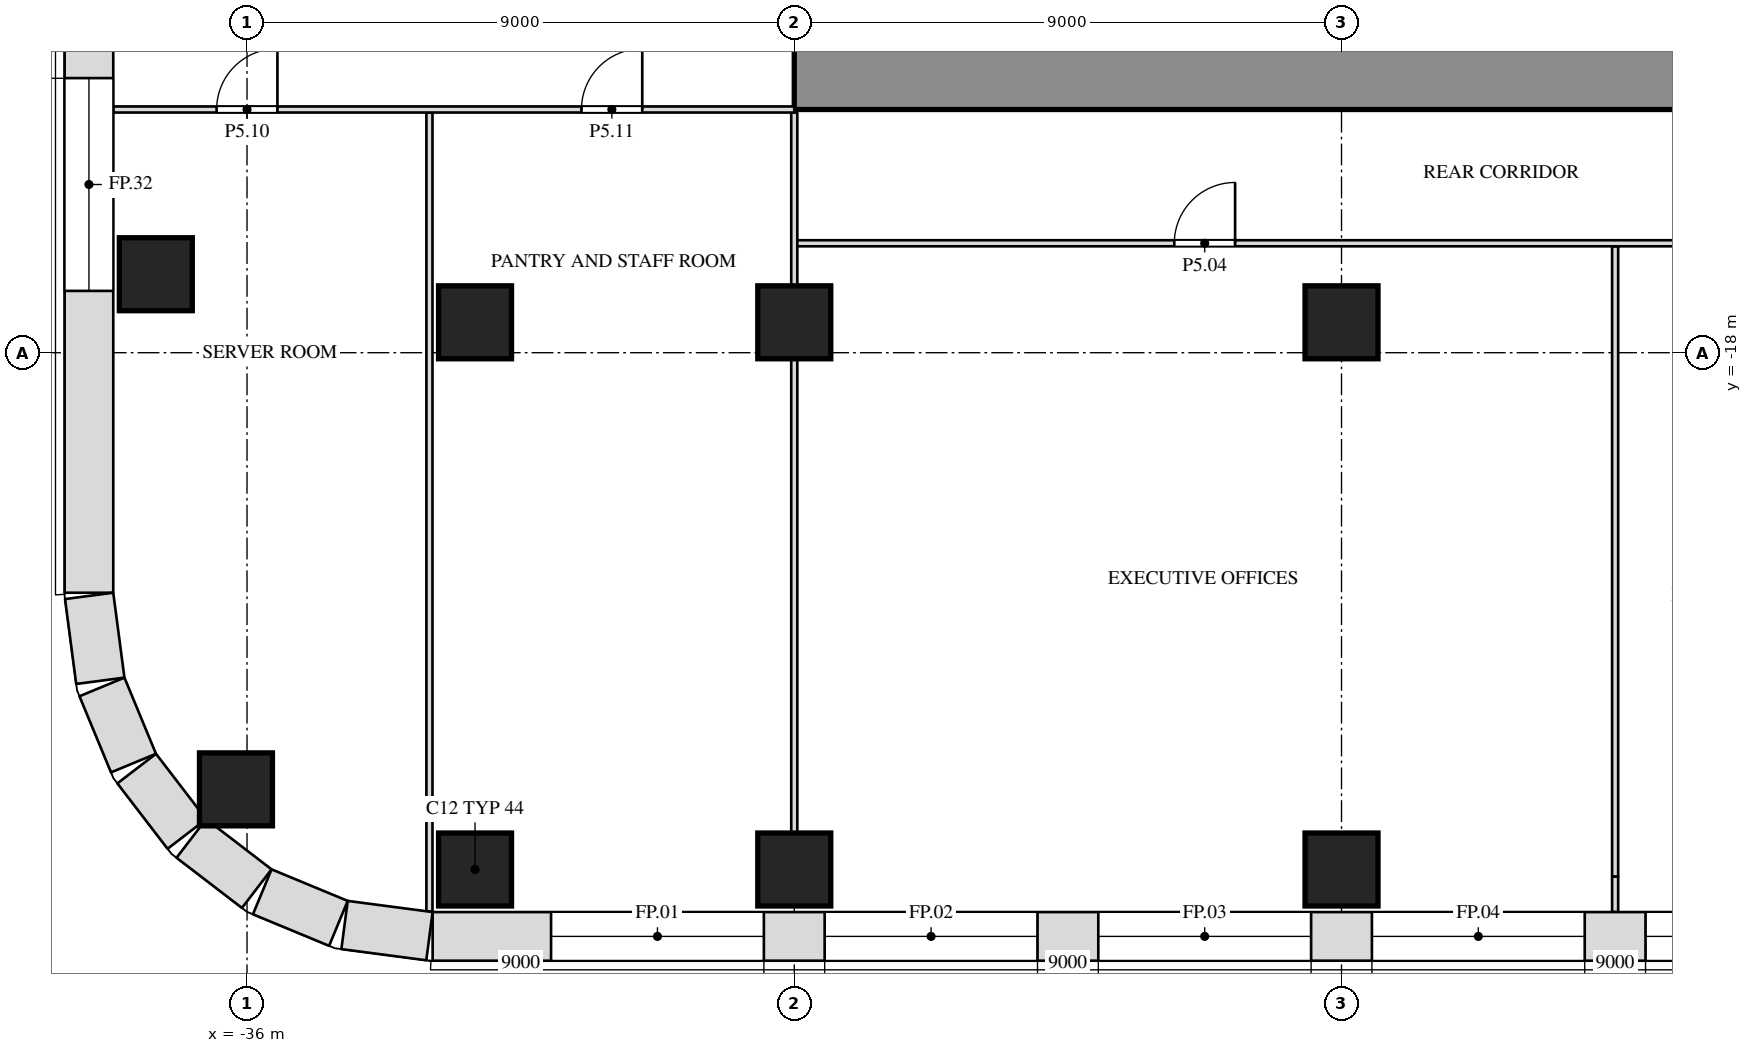
"""IFC4 building model, lengths in metres.
Left out: names, types, materials, properties, quantities, classifications, styles, units other than length and angle.
Written with IfcOpenShell. Run it as: python <this file> out.ifc"""

import sys

from ifc_helpers import new_model, si_unit, direction, frame, frame_2d, origin, origin_2d, place, context, subcontext, project, spatial, rectangle, extrude, element, fill, save


model = new_model("IFC4")
c1 = context("Model", 3, precision=1e-05, world=origin(), true_north=direction((0.0, 1.0)))
c2 = subcontext(c1, "Body", "Model", "MODEL_VIEW")
j1 = project(units=[si_unit("LENGTHUNIT", "METRE"), si_unit("PLANEANGLEUNIT", "RADIAN")], contexts=[c1])
p1 = place(None, origin())
s1 = spatial("IfcSite", under=j1, at=p1, CompositionType="ELEMENT")
p2 = place(p1, origin())
s2 = spatial("IfcBuilding", under=s1, at=p2, CompositionType="ELEMENT")
p3 = place(p2, frame((0.0, 0.0, 33.0)))
s3 = spatial("IfcBuildingStorey", under=s2, at=p3, CompositionType="ELEMENT", Elevation=33.0)
for number, where, z_axis, x_axis in (
    (1, (-32.25, -26.5, 0.0), (0.0, 0.0, 1.0), (1.0, 0.0, 0.0)),
    (2, (-27.0, -26.5, 0.0), (0.0, 0.0, 1.0), (1.0, 0.0, 0.0)),
    (3, (-18.0, -26.5, 0.0), (0.0, 0.0, 1.0), (1.0, 0.0, 0.0)),
    (4, (-36.182, -25.182, 0.0), (0.0, 0.0, 1.0), (1.0, 0.0, 0.0)),
    (5, (-32.25, -17.5, 0.0), (0.0, 0.0, 1.0), (1.0, 0.0, 0.0)),
    (6, (-27.0, -17.5, 0.0), (0.0, 0.0, 1.0), (1.0, 0.0, 0.0)),
    (7, (-18.0, -17.5, 0.0), (0.0, 0.0, 1.0), (1.0, 0.0, 0.0)),
    (8, (-37.5, -16.709, 0.0), (0.0, 0.0, 1.0), (1.0, 0.0, 0.0)),
):
    element("IfcColumn", number, at=place(p3, frame(where, z_axis=z_axis, x_axis=x_axis)), inside=s3, PredefinedType="COLUMN", context=c2, shape_type="SweptSolid", body=[
        extrude(rectangle(XDim=1.2, YDim=1.2, at=origin_2d()), origin(), (0.0, 0.0, 1.0), 6.0),
    ])
p4 = place(p3, frame((-27.0, -13.4, 0.0), z_axis=(0.0, 0.0, 1.0), x_axis=(1.0, 0.0, 0.0)))
e9 = element("IfcWall", 9, at=p4, inside=s3, PredefinedType="SHEAR", context=c2, shape_type="SweptSolid", body=[
    extrude(rectangle(XDim=54.0, YDim=1.2, at=frame_2d((27.0, 0.0))), origin(), (0.0, 0.0, 1.0), 5.75),
])
p5 = place(p4, frame((16.45, 0.0, 0.0)))
e10 = element("IfcOpeningElement", 10, at=p5, cuts=e9, PredefinedType="OPENING", context=c2, shape_type="SweptSolid", body=[
    extrude(rectangle(XDim=1.0, YDim=2.1, at=frame_2d((0.5, 1.05))), frame((0.0, 0.612, 0.0), z_axis=(0.0, -1.0, 0.0), x_axis=(1.0, 0.0, 0.0)), (0.0, 0.0, 1.0), 1.224),
])
p6 = place(p4, frame((36.55, 0.0, 0.0)))
e11 = element("IfcOpeningElement", 11, at=p6, cuts=e9, PredefinedType="OPENING", context=c2, shape_type="SweptSolid", body=[
    extrude(rectangle(XDim=1.0, YDim=2.1, at=frame_2d((0.5, 1.05))), frame((0.0, 0.612, 0.0), z_axis=(0.0, -1.0, 0.0), x_axis=(1.0, 0.0, 0.0)), (0.0, 0.0, 1.0), 1.224),
])
p7 = place(p3, frame((-27.0, -25.9, 0.0), z_axis=(0.0, 0.0, 1.0), x_axis=(0.0, 1.0, 0.0)))
e12 = element("IfcWall", 12, at=p7, inside=s3, PredefinedType="PARTITIONING", context=c2, shape_type="SweptSolid", body=[
    extrude(rectangle(XDim=7.8, YDim=0.1, at=frame_2d((3.9, 0.0))), origin(), (0.0, 0.0, 1.0), 5.138),
])
p8 = place(p3, frame((-27.0, -16.9, 0.0), z_axis=(0.0, 0.0, 1.0), x_axis=(0.0, 1.0, 0.0)))
e13 = element("IfcWall", 13, at=p8, inside=s3, PredefinedType="PARTITIONING", context=c2, shape_type="SweptSolid", body=[
    extrude(rectangle(XDim=2.85, YDim=0.1, at=frame_2d((1.425, 0.0))), origin(), (0.0, 0.0, 1.0), 5.138),
])
p9 = place(p3, frame((-13.5, -27.2, 0.0), z_axis=(0.0, 0.0, 1.0), x_axis=(0.0, 1.0, 0.0)))
e14 = element("IfcWall", 14, at=p9, inside=s3, PredefinedType="PARTITIONING", context=c2, shape_type="SweptSolid", body=[
    extrude(rectangle(XDim=0.585, YDim=0.1, at=frame_2d((0.293, 0.0))), origin(), (0.0, 0.0, 1.0), 5.75),
])
p10 = place(p3, frame((-13.5, -26.615, 0.0), z_axis=(0.0, 0.0, 1.0), x_axis=(0.0, 1.0, 0.0)))
e15 = element("IfcWall", 15, at=p10, inside=s3, PredefinedType="PARTITIONING", context=c2, shape_type="SweptSolid", body=[
    extrude(rectangle(XDim=10.365, YDim=0.1, at=frame_2d((5.182, 0.0))), origin(), (0.0, 0.0, 1.0), 5.138),
])
p11 = place(p3, frame((-33.0, -27.19, 0.0), z_axis=(0.0, 0.0, 1.0), x_axis=(0.0, 1.0, 0.0)))
e16 = element("IfcWall", 16, at=p11, inside=s3, PredefinedType="PARTITIONING", context=c2, shape_type="SweptSolid", body=[
    extrude(rectangle(XDim=13.14, YDim=0.1, at=frame_2d((6.57, 0.0))), origin(), (0.0, 0.0, 1.0), 5.75),
])
p12 = place(p3, frame((-26.95, -16.2, 0.0), z_axis=(0.0, 0.0, 1.0), x_axis=(1.0, 0.0, 0.0)))
e17 = element("IfcWall", 17, at=p12, inside=s3, PredefinedType="PARTITIONING", context=c2, shape_type="SweptSolid", body=[
    extrude(rectangle(XDim=18.025, YDim=0.1, at=frame_2d((9.012, 0.0))), origin(), (0.0, 0.0, 1.0), 5.75),
])
p13 = place(p12, frame((6.2, 0.0, 0.0)))
e18 = element("IfcOpeningElement", 18, at=p13, cuts=e17, PredefinedType="OPENING", context=c2, shape_type="SweptSolid", body=[
    extrude(rectangle(XDim=1.0, YDim=2.1, at=frame_2d((0.5, 1.05))), frame((0.0, 0.062, 0.0), z_axis=(0.0, -1.0, 0.0), x_axis=(1.0, 0.0, 0.0)), (0.0, 0.0, 1.0), 0.124),
])
p14 = place(p12, frame((15.2, 0.0, 0.0)))
e19 = element("IfcOpeningElement", 19, at=p14, cuts=e17, PredefinedType="OPENING", context=c2, shape_type="SweptSolid", body=[
    extrude(rectangle(XDim=1.0, YDim=2.1, at=frame_2d((0.5, 1.05))), frame((0.0, 0.062, 0.0), z_axis=(0.0, -1.0, 0.0), x_axis=(1.0, 0.0, 0.0)), (0.0, 0.0, 1.0), 0.124),
])
p15 = place(p3, frame((-38.2, -14.0, 0.0), z_axis=(0.0, 0.0, 1.0), x_axis=(1.0, 0.0, 0.0)))
e20 = element("IfcWall", 20, at=p15, inside=s3, PredefinedType="PARTITIONING", context=c2, shape_type="SweptSolid", body=[
    extrude(rectangle(XDim=11.2, YDim=0.1, at=frame_2d((5.6, 0.0))), origin(), (0.0, 0.0, 1.0), 5.75),
])
p16 = place(p15, frame((1.7, 0.0, 0.0)))
e21 = element("IfcOpeningElement", 21, at=p16, cuts=e20, PredefinedType="OPENING", context=c2, shape_type="SweptSolid", body=[
    extrude(rectangle(XDim=1.0, YDim=2.1, at=frame_2d((0.5, 1.05))), frame((0.0, 0.062, 0.0), z_axis=(0.0, -1.0, 0.0), x_axis=(1.0, 0.0, 0.0)), (0.0, 0.0, 1.0), 0.124),
])
p17 = place(p15, frame((7.7, 0.0, 0.0)))
e22 = element("IfcOpeningElement", 22, at=p17, cuts=e20, PredefinedType="OPENING", context=c2, shape_type="SweptSolid", body=[
    extrude(rectangle(XDim=1.0, YDim=2.1, at=frame_2d((0.5, 1.05))), frame((0.0, 0.062, 0.0), z_axis=(0.0, -1.0, 0.0), x_axis=(1.0, 0.0, 0.0)), (0.0, 0.0, 1.0), 0.124),
])
p18 = place(p3, frame((-32.948, -27.6, 0.0), z_axis=(0.0, 0.0, 1.0), x_axis=(1.0, 0.0, 0.0)))
e23 = element("IfcWall", 23, at=p18, inside=s3, PredefinedType="SOLIDWALL", context=c2, shape_type="SweptSolid", body=[
    extrude(rectangle(XDim=65.895, YDim=0.8, at=frame_2d((32.948, 0.0))), origin(), (0.0, 0.0, 1.0), 5.75),
])
p19 = place(p18, frame((1.948, 0.0, 1.0)))
e24 = element("IfcOpeningElement", 24, at=p19, cuts=e23, PredefinedType="OPENING", context=c2, shape_type="SweptSolid", body=[
    extrude(rectangle(XDim=3.5, YDim=4.0, at=frame_2d((1.75, 2.0))), frame((0.0, 0.412, 0.0), z_axis=(0.0, -1.0, 0.0), x_axis=(1.0, 0.0, 0.0)), (0.0, 0.0, 1.0), 0.824),
])
p20 = place(p18, frame((6.448, 0.0, 1.0)))
e25 = element("IfcOpeningElement", 25, at=p20, cuts=e23, PredefinedType="OPENING", context=c2, shape_type="SweptSolid", body=[
    extrude(rectangle(XDim=3.5, YDim=4.0, at=frame_2d((1.75, 2.0))), frame((0.0, 0.412, 0.0), z_axis=(0.0, -1.0, 0.0), x_axis=(1.0, 0.0, 0.0)), (0.0, 0.0, 1.0), 0.824),
])
p21 = place(p18, frame((10.948, 0.0, 1.0)))
e26 = element("IfcOpeningElement", 26, at=p21, cuts=e23, PredefinedType="OPENING", context=c2, shape_type="SweptSolid", body=[
    extrude(rectangle(XDim=3.5, YDim=4.0, at=frame_2d((1.75, 2.0))), frame((0.0, 0.412, 0.0), z_axis=(0.0, -1.0, 0.0), x_axis=(1.0, 0.0, 0.0)), (0.0, 0.0, 1.0), 0.824),
])
p22 = place(p18, frame((15.448, 0.0, 1.0)))
e27 = element("IfcOpeningElement", 27, at=p22, cuts=e23, PredefinedType="OPENING", context=c2, shape_type="SweptSolid", body=[
    extrude(rectangle(XDim=3.5, YDim=4.0, at=frame_2d((1.75, 2.0))), frame((0.0, 0.412, 0.0), z_axis=(0.0, -1.0, 0.0), x_axis=(1.0, 0.0, 0.0)), (0.0, 0.0, 1.0), 0.824),
])
p23 = place(p18, frame((19.948, 0.0, 1.0)))
e28 = element("IfcOpeningElement", 28, at=p23, cuts=e23, PredefinedType="OPENING", context=c2, shape_type="SweptSolid", body=[
    extrude(rectangle(XDim=3.5, YDim=4.0, at=frame_2d((1.75, 2.0))), frame((0.0, 0.412, 0.0), z_axis=(0.0, -1.0, 0.0), x_axis=(1.0, 0.0, 0.0)), (0.0, 0.0, 1.0), 0.824),
])
p24 = place(p18, frame((24.448, 0.0, 1.0)))
e29 = element("IfcOpeningElement", 29, at=p24, cuts=e23, PredefinedType="OPENING", context=c2, shape_type="SweptSolid", body=[
    extrude(rectangle(XDim=3.5, YDim=4.0, at=frame_2d((1.75, 2.0))), frame((0.0, 0.412, 0.0), z_axis=(0.0, -1.0, 0.0), x_axis=(1.0, 0.0, 0.0)), (0.0, 0.0, 1.0), 0.824),
])
p25 = place(p18, frame((28.948, 0.0, 1.0)))
e30 = element("IfcOpeningElement", 30, at=p25, cuts=e23, PredefinedType="OPENING", context=c2, shape_type="SweptSolid", body=[
    extrude(rectangle(XDim=3.5, YDim=4.0, at=frame_2d((1.75, 2.0))), frame((0.0, 0.412, 0.0), z_axis=(0.0, -1.0, 0.0), x_axis=(1.0, 0.0, 0.0)), (0.0, 0.0, 1.0), 0.824),
])
p26 = place(p18, frame((33.448, 0.0, 1.0)))
e31 = element("IfcOpeningElement", 31, at=p26, cuts=e23, PredefinedType="OPENING", context=c2, shape_type="SweptSolid", body=[
    extrude(rectangle(XDim=3.5, YDim=4.0, at=frame_2d((1.75, 2.0))), frame((0.0, 0.412, 0.0), z_axis=(0.0, -1.0, 0.0), x_axis=(1.0, 0.0, 0.0)), (0.0, 0.0, 1.0), 0.824),
])
p27 = place(p18, frame((37.948, 0.0, 1.0)))
e32 = element("IfcOpeningElement", 32, at=p27, cuts=e23, PredefinedType="OPENING", context=c2, shape_type="SweptSolid", body=[
    extrude(rectangle(XDim=3.5, YDim=4.0, at=frame_2d((1.75, 2.0))), frame((0.0, 0.412, 0.0), z_axis=(0.0, -1.0, 0.0), x_axis=(1.0, 0.0, 0.0)), (0.0, 0.0, 1.0), 0.824),
])
p28 = place(p18, frame((42.448, 0.0, 1.0)))
e33 = element("IfcOpeningElement", 33, at=p28, cuts=e23, PredefinedType="OPENING", context=c2, shape_type="SweptSolid", body=[
    extrude(rectangle(XDim=3.5, YDim=4.0, at=frame_2d((1.75, 2.0))), frame((0.0, 0.412, 0.0), z_axis=(0.0, -1.0, 0.0), x_axis=(1.0, 0.0, 0.0)), (0.0, 0.0, 1.0), 0.824),
])
p29 = place(p18, frame((46.948, 0.0, 1.0)))
e34 = element("IfcOpeningElement", 34, at=p29, cuts=e23, PredefinedType="OPENING", context=c2, shape_type="SweptSolid", body=[
    extrude(rectangle(XDim=3.5, YDim=4.0, at=frame_2d((1.75, 2.0))), frame((0.0, 0.412, 0.0), z_axis=(0.0, -1.0, 0.0), x_axis=(1.0, 0.0, 0.0)), (0.0, 0.0, 1.0), 0.824),
])
p30 = place(p18, frame((51.448, 0.0, 1.0)))
e35 = element("IfcOpeningElement", 35, at=p30, cuts=e23, PredefinedType="OPENING", context=c2, shape_type="SweptSolid", body=[
    extrude(rectangle(XDim=3.5, YDim=4.0, at=frame_2d((1.75, 2.0))), frame((0.0, 0.412, 0.0), z_axis=(0.0, -1.0, 0.0), x_axis=(1.0, 0.0, 0.0)), (0.0, 0.0, 1.0), 0.824),
])
p31 = place(p18, frame((55.948, 0.0, 1.0)))
e36 = element("IfcOpeningElement", 36, at=p31, cuts=e23, PredefinedType="OPENING", context=c2, shape_type="SweptSolid", body=[
    extrude(rectangle(XDim=3.5, YDim=4.0, at=frame_2d((1.75, 2.0))), frame((0.0, 0.412, 0.0), z_axis=(0.0, -1.0, 0.0), x_axis=(1.0, 0.0, 0.0)), (0.0, 0.0, 1.0), 0.824),
])
p32 = place(p18, frame((60.448, 0.0, 1.0)))
e37 = element("IfcOpeningElement", 37, at=p32, cuts=e23, PredefinedType="OPENING", context=c2, shape_type="SweptSolid", body=[
    extrude(rectangle(XDim=3.5, YDim=4.0, at=frame_2d((1.75, 2.0))), frame((0.0, 0.412, 0.0), z_axis=(0.0, -1.0, 0.0), x_axis=(1.0, 0.0, 0.0)), (0.0, 0.0, 1.0), 0.824),
])
p33 = place(p3, frame((-38.6, 13.948, 0.0), z_axis=(0.0, 0.0, 1.0), x_axis=(0.0, -1.0, 0.0)))
e38 = element("IfcWall", 38, at=p33, inside=s3, PredefinedType="SOLIDWALL", context=c2, shape_type="SweptSolid", body=[
    extrude(rectangle(XDim=35.895, YDim=0.8, at=frame_2d((17.948, 0.0))), origin(), (0.0, 0.0, 1.0), 5.75),
])
p34 = place(p33, frame((4.964, 0.0, 1.0)))
e39 = element("IfcOpeningElement", 39, at=p34, cuts=e38, PredefinedType="OPENING", context=c2, shape_type="SweptSolid", body=[
    extrude(rectangle(XDim=3.5, YDim=4.0, at=frame_2d((1.75, 2.0))), frame((0.0, 0.412, 0.0), z_axis=(0.0, -1.0, 0.0), x_axis=(1.0, 0.0, 0.0)), (0.0, 0.0, 1.0), 0.824),
])
p35 = place(p33, frame((9.458, 0.0, 1.0)))
e40 = element("IfcOpeningElement", 40, at=p35, cuts=e38, PredefinedType="OPENING", context=c2, shape_type="SweptSolid", body=[
    extrude(rectangle(XDim=3.5, YDim=4.0, at=frame_2d((1.75, 2.0))), frame((0.0, 0.412, 0.0), z_axis=(0.0, -1.0, 0.0), x_axis=(1.0, 0.0, 0.0)), (0.0, 0.0, 1.0), 0.824),
])
p36 = place(p33, frame((13.951, 0.0, 1.0)))
e41 = element("IfcOpeningElement", 41, at=p36, cuts=e38, PredefinedType="OPENING", context=c2, shape_type="SweptSolid", body=[
    extrude(rectangle(XDim=3.5, YDim=4.0, at=frame_2d((1.75, 2.0))), frame((0.0, 0.412, 0.0), z_axis=(0.0, -1.0, 0.0), x_axis=(1.0, 0.0, 0.0)), (0.0, 0.0, 1.0), 0.824),
])
p37 = place(p33, frame((18.444, 0.0, 1.0)))
e42 = element("IfcOpeningElement", 42, at=p37, cuts=e38, PredefinedType="OPENING", context=c2, shape_type="SweptSolid", body=[
    extrude(rectangle(XDim=3.5, YDim=4.0, at=frame_2d((1.75, 2.0))), frame((0.0, 0.412, 0.0), z_axis=(0.0, -1.0, 0.0), x_axis=(1.0, 0.0, 0.0)), (0.0, 0.0, 1.0), 0.824),
])
p38 = place(p33, frame((22.938, 0.0, 1.0)))
e43 = element("IfcOpeningElement", 43, at=p38, cuts=e38, PredefinedType="OPENING", context=c2, shape_type="SweptSolid", body=[
    extrude(rectangle(XDim=3.5, YDim=4.0, at=frame_2d((1.75, 2.0))), frame((0.0, 0.412, 0.0), z_axis=(0.0, -1.0, 0.0), x_axis=(1.0, 0.0, 0.0)), (0.0, 0.0, 1.0), 0.824),
])
p39 = place(p33, frame((27.431, 0.0, 1.0)))
e44 = element("IfcOpeningElement", 44, at=p39, cuts=e38, PredefinedType="OPENING", context=c2, shape_type="SweptSolid", body=[
    extrude(rectangle(XDim=3.5, YDim=4.0, at=frame_2d((1.75, 2.0))), frame((0.0, 0.412, 0.0), z_axis=(0.0, -1.0, 0.0), x_axis=(1.0, 0.0, 0.0)), (0.0, 0.0, 1.0), 0.824),
])
p40 = place(p3, frame((-38.597, -22.0, 0.0), z_axis=(0.0, 0.0, 1.0), x_axis=(0.130517283865, -0.99144603414, 0.0)))
e45 = element("IfcWall", 45, at=p40, inside=s3, PredefinedType="SOLIDWALL", context=c2, shape_type="SweptSolid", body=[
    extrude(rectangle(XDim=1.408, YDim=0.8, at=frame_2d((0.704, 0.0))), origin(), (0.0, 0.0, 1.0), 5.75),
])
p41 = place(p3, frame((-38.386, -23.497, 0.0), z_axis=(0.0, 0.0, 1.0), x_axis=(0.38276009378, -0.923847774587, 0.0)))
e46 = element("IfcWall", 46, at=p41, inside=s3, PredefinedType="SOLIDWALL", context=c2, shape_type="SweptSolid", body=[
    extrude(rectangle(XDim=1.355, YDim=0.8, at=frame_2d((0.678, 0.0))), origin(), (0.0, 0.0, 1.0), 5.75),
])
for number, where, z_axis, x_axis in (
    (47, (-37.815, -24.84, 0.0), (0.0, 0.0, 1.0), (0.609, -0.793, 0.0)),
    (48, (-36.916, -25.989, 0.0), (0.0, 0.0, 1.0), (0.793, -0.609, 0.0)),
):
    element("IfcWall", number, at=place(p3, frame(where, z_axis=z_axis, x_axis=x_axis)), inside=s3, PredefinedType="SOLIDWALL", context=c2, shape_type="SweptSolid", body=[
        extrude(rectangle(XDim=1.356, YDim=0.8, at=frame_2d((0.678, 0.0))), origin(), (0.0, 0.0, 1.0), 5.75),
    ])
p42 = place(p3, frame((-35.75, -26.867, 0.0), z_axis=(0.0, 0.0, 1.0), x_axis=(0.923847774587, -0.38276009378, 0.0)))
e49 = element("IfcWall", 49, at=p42, inside=s3, PredefinedType="SOLIDWALL", context=c2, shape_type="SweptSolid", body=[
    extrude(rectangle(XDim=1.355, YDim=0.8, at=frame_2d((0.678, 0.0))), origin(), (0.0, 0.0, 1.0), 5.75),
])
p43 = place(p3, frame((-34.396, -27.413, 0.0), z_axis=(0.0, 0.0, 1.0), x_axis=(0.99144603414, -0.130517283865, 0.0)))
e50 = element("IfcWall", 50, at=p43, inside=s3, PredefinedType="SOLIDWALL", context=c2, shape_type="SweptSolid", body=[
    extrude(rectangle(XDim=1.408, YDim=0.8, at=frame_2d((0.704, 0.0))), origin(), (0.0, 0.0, 1.0), 5.75),
])
p44 = place(p13, origin())
e51 = element("IfcDoor", 51, at=p44, inside=s3, OperationType="SINGLE_SWING_RIGHT", PredefinedType="DOOR", context=c2, shape_type="SweptSolid", body=[
    extrude(rectangle(XDim=1.0, YDim=2.1, at=frame_2d((0.5, 1.05))), frame((0.0, 0.025, 0.0), z_axis=(0.0, -1.0, 0.0), x_axis=(1.0, 0.0, 0.0)), (0.0, 0.0, 1.0), 0.05),
])
fill(e18, e51)
p45 = place(p16, origin())
e52 = element("IfcDoor", 52, at=p45, inside=s3, OperationType="SINGLE_SWING_RIGHT", PredefinedType="DOOR", context=c2, shape_type="SweptSolid", body=[
    extrude(rectangle(XDim=1.0, YDim=2.1, at=frame_2d((0.5, 1.05))), frame((0.0, 0.025, 0.0), z_axis=(0.0, -1.0, 0.0), x_axis=(1.0, 0.0, 0.0)), (0.0, 0.0, 1.0), 0.05),
])
fill(e21, e52)
p46 = place(p17, origin())
e53 = element("IfcDoor", 53, at=p46, inside=s3, OperationType="SINGLE_SWING_RIGHT", PredefinedType="DOOR", context=c2, shape_type="SweptSolid", body=[
    extrude(rectangle(XDim=1.0, YDim=2.1, at=frame_2d((0.5, 1.05))), frame((0.0, 0.025, 0.0), z_axis=(0.0, -1.0, 0.0), x_axis=(1.0, 0.0, 0.0)), (0.0, 0.0, 1.0), 0.05),
])
fill(e22, e53)
p47 = place(p19, origin())
e54 = element("IfcWindow", 54, at=p47, inside=s3, PartitioningType="SINGLE_PANEL", PredefinedType="WINDOW", context=c2, shape_type="SweptSolid", body=[
    extrude(rectangle(XDim=3.5, YDim=4.0, at=frame_2d((1.75, 2.0))), frame((0.0, 0.03, 0.0), z_axis=(0.0, -1.0, 0.0), x_axis=(1.0, 0.0, 0.0)), (0.0, 0.0, 1.0), 0.06),
])
fill(e24, e54)
p48 = place(p20, origin())
e55 = element("IfcWindow", 55, at=p48, inside=s3, PartitioningType="SINGLE_PANEL", PredefinedType="WINDOW", context=c2, shape_type="SweptSolid", body=[
    extrude(rectangle(XDim=3.5, YDim=4.0, at=frame_2d((1.75, 2.0))), frame((0.0, 0.03, 0.0), z_axis=(0.0, -1.0, 0.0), x_axis=(1.0, 0.0, 0.0)), (0.0, 0.0, 1.0), 0.06),
])
fill(e25, e55)
p49 = place(p21, origin())
e56 = element("IfcWindow", 56, at=p49, inside=s3, PartitioningType="SINGLE_PANEL", PredefinedType="WINDOW", context=c2, shape_type="SweptSolid", body=[
    extrude(rectangle(XDim=3.5, YDim=4.0, at=frame_2d((1.75, 2.0))), frame((0.0, 0.03, 0.0), z_axis=(0.0, -1.0, 0.0), x_axis=(1.0, 0.0, 0.0)), (0.0, 0.0, 1.0), 0.06),
])
fill(e26, e56)
p50 = place(p22, origin())
e57 = element("IfcWindow", 57, at=p50, inside=s3, PartitioningType="SINGLE_PANEL", PredefinedType="WINDOW", context=c2, shape_type="SweptSolid", body=[
    extrude(rectangle(XDim=3.5, YDim=4.0, at=frame_2d((1.75, 2.0))), frame((0.0, 0.03, 0.0), z_axis=(0.0, -1.0, 0.0), x_axis=(1.0, 0.0, 0.0)), (0.0, 0.0, 1.0), 0.06),
])
fill(e27, e57)
p51 = place(p23, origin())
e58 = element("IfcWindow", 58, at=p51, inside=s3, PartitioningType="SINGLE_PANEL", PredefinedType="WINDOW", context=c2, shape_type="SweptSolid", body=[
    extrude(rectangle(XDim=3.5, YDim=4.0, at=frame_2d((1.75, 2.0))), frame((0.0, 0.03, 0.0), z_axis=(0.0, -1.0, 0.0), x_axis=(1.0, 0.0, 0.0)), (0.0, 0.0, 1.0), 0.06),
])
fill(e28, e58)
p52 = place(p39, origin())
e59 = element("IfcWindow", 59, at=p52, inside=s3, PartitioningType="SINGLE_PANEL", PredefinedType="WINDOW", context=c2, shape_type="SweptSolid", body=[
    extrude(rectangle(XDim=3.5, YDim=4.0, at=frame_2d((1.75, 2.0))), frame((0.0, 0.03, 0.0), z_axis=(0.0, -1.0, 0.0), x_axis=(1.0, 0.0, 0.0)), (0.0, 0.0, 1.0), 0.06),
])
fill(e44, e59)
save(model, sys.argv[1])
